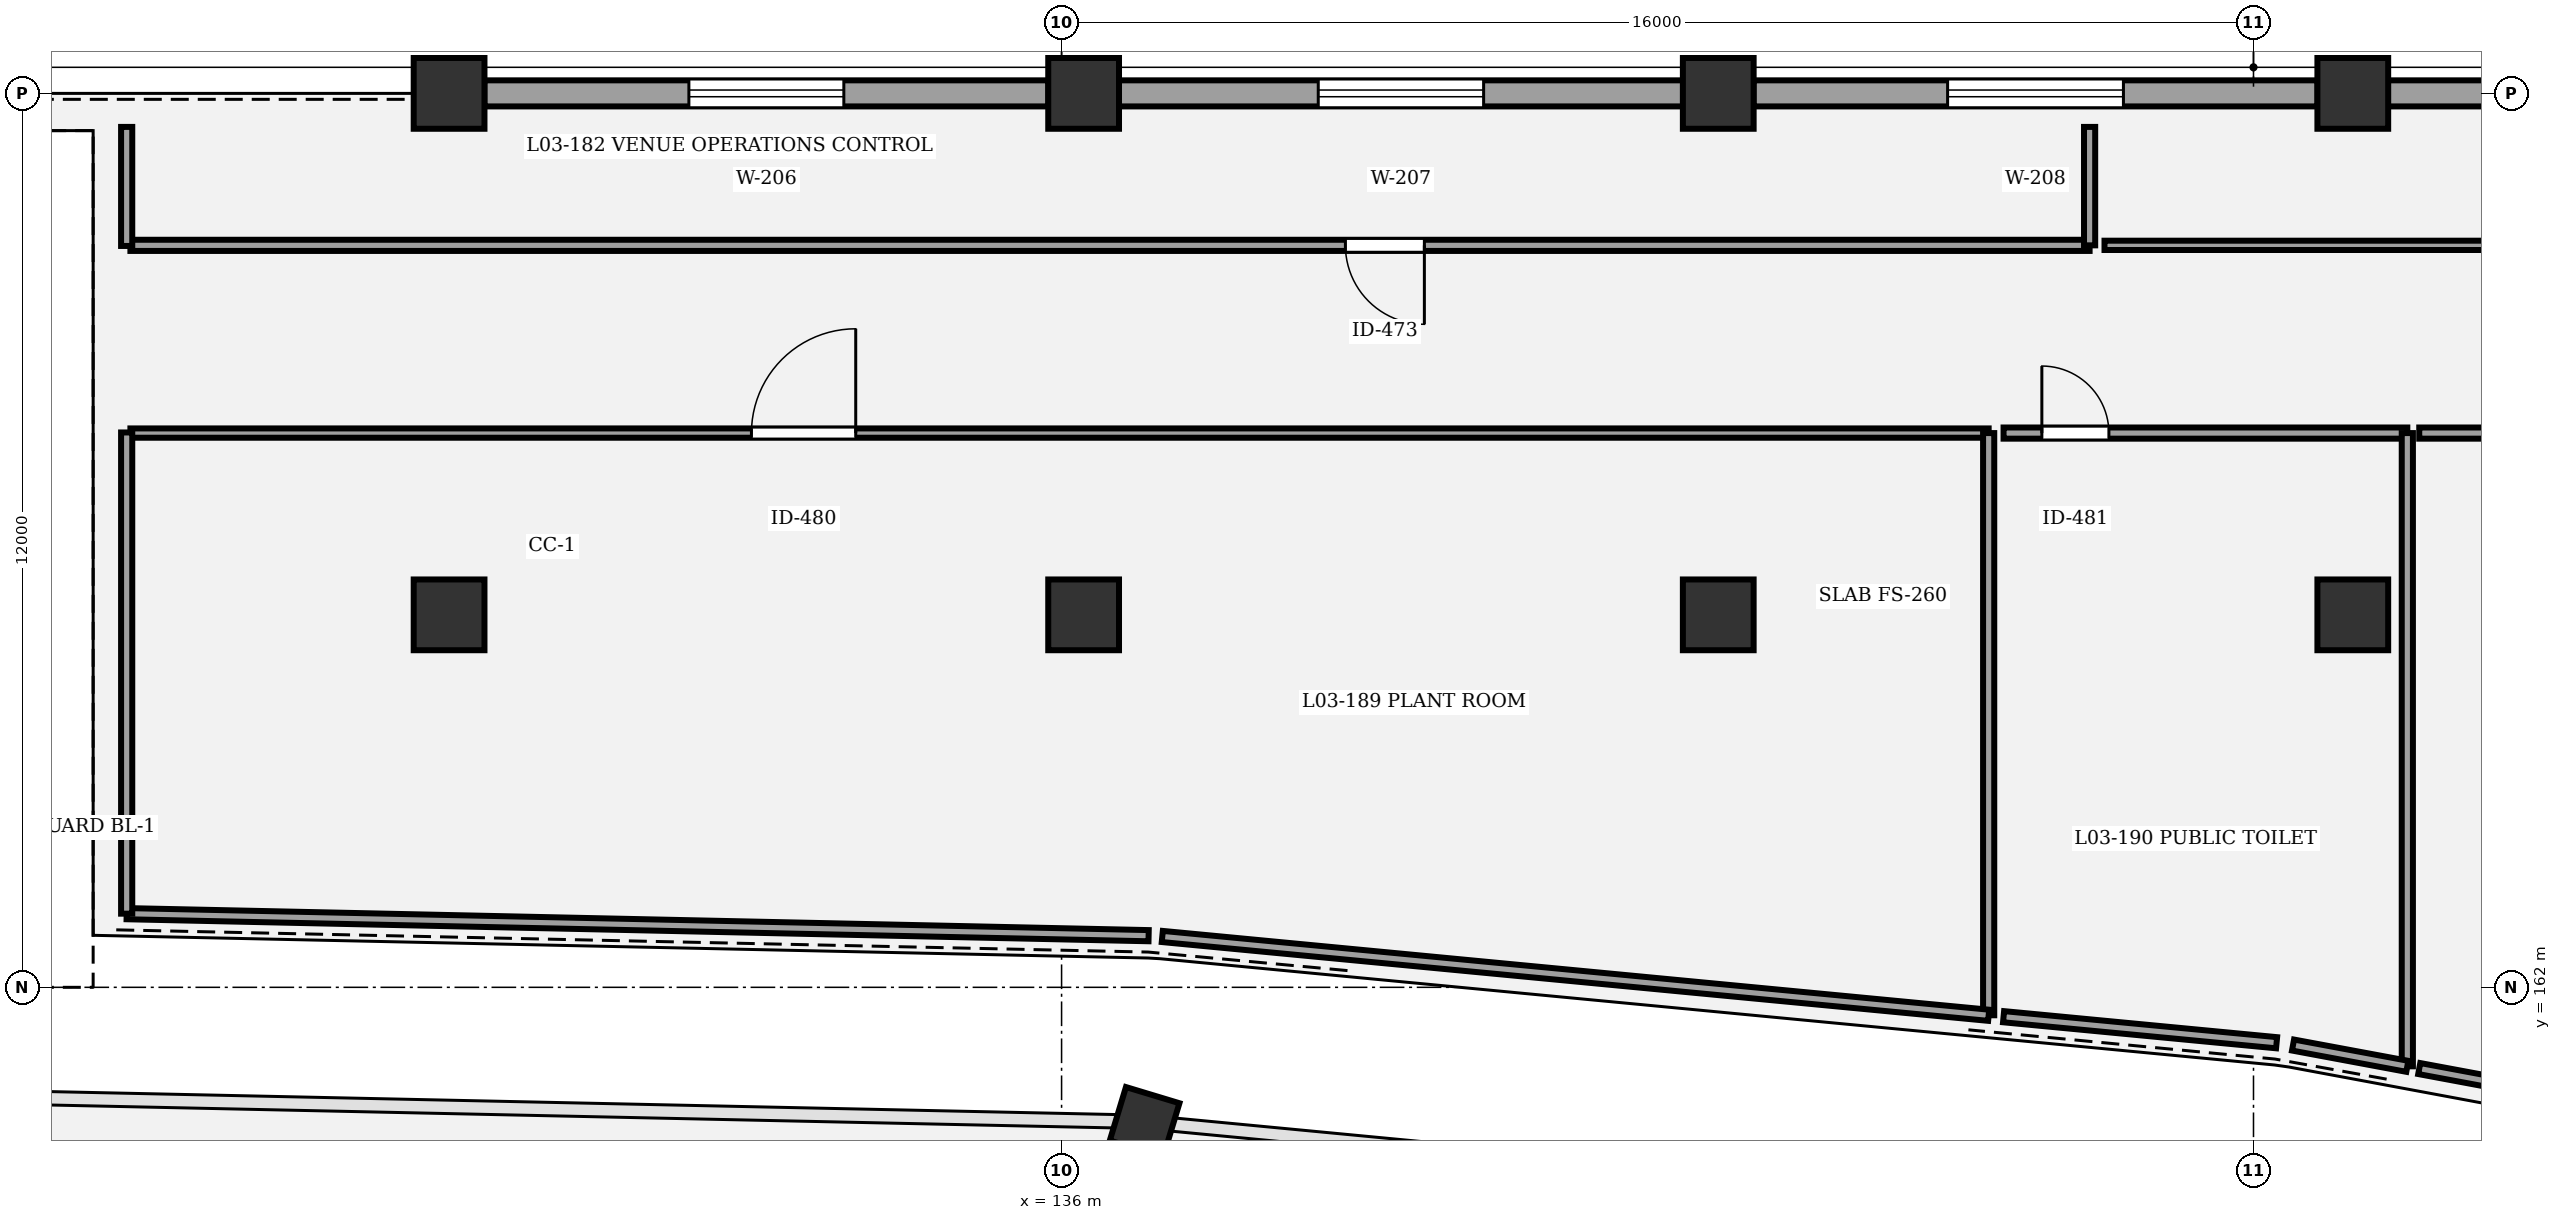
"""IFC4 building model, lengths in metres.
Left out: names, types, materials, properties, quantities, classifications, styles, units other than length and angle.
Written with IfcOpenShell. Run it as: python <this file> out.ifc"""

import sys

from ifc_helpers import new_model, si_unit, direction, frame, frame_2d, origin, origin_2d, place, context, subcontext, project, spatial, rectangle, circle, extrude, element, fill, save


model = new_model("IFC4")
c1 = context("Model", 3, precision=1e-05, world=origin(), true_north=direction((0.0, 1.0)))
c2 = subcontext(c1, "Body", "Model", "MODEL_VIEW")
j1 = project(units=[si_unit("LENGTHUNIT", "METRE"), si_unit("PLANEANGLEUNIT", "RADIAN")], contexts=[c1])
p1 = place(None, origin())
s1 = spatial("IfcSite", under=j1, at=p1, CompositionType="ELEMENT")
p2 = place(p1, origin())
s2 = spatial("IfcBuilding", under=s1, at=p2, CompositionType="ELEMENT")
p3 = place(p2, frame((0.0, 0.0, 14.7)))
s3 = spatial("IfcBuildingStorey", under=s2, at=p3, CompositionType="ELEMENT", Elevation=14.7)
p4 = place(p3, frame((137.115, 160.194, 0.0), z_axis=(0.0, 0.0, 1.0), x_axis=(0.289198876314, 0.957269037387, 0.0)))
e1 = element("IfcColumn", 1, at=p4, inside=s3, PredefinedType="COLUMN", context=c2, shape_type="SweptSolid", body=[
    extrude(rectangle(XDim=0.75, YDim=0.75, at=origin_2d()), origin(), (0.0, 0.0, 1.0), 4.5),
])
for number, where, z_axis, x_axis in (
    (2, (127.778, 167.0, 0.0), (0.0, 0.0, 1.0), (1.0, 0.0, 0.0)),
    (3, (127.778, 174.0, 0.0), (0.0, 0.0, 1.0), (1.0, 0.0, 0.0)),
    (4, (136.296, 167.0, 0.0), (0.0, 0.0, 1.0), (1.0, 0.0, 0.0)),
    (5, (136.296, 174.0, 0.0), (0.0, 0.0, 1.0), (1.0, 0.0, 0.0)),
    (6, (144.815, 167.0, 0.0), (0.0, 0.0, 1.0), (1.0, 0.0, 0.0)),
    (7, (144.815, 174.0, 0.0), (0.0, 0.0, 1.0), (1.0, 0.0, 0.0)),
    (8, (153.333, 167.0, 0.0), (0.0, 0.0, 1.0), (1.0, 0.0, 0.0)),
    (9, (153.333, 174.0, 0.0), (0.0, 0.0, 1.0), (1.0, 0.0, 0.0)),
):
    element("IfcColumn", number, at=place(p3, frame(where, z_axis=z_axis, x_axis=x_axis)), inside=s3, PredefinedType="COLUMN", context=c2, shape_type="SweptSolid", body=[
        extrude(circle(Radius=0.475, at=origin_2d()), origin(), (0.0, 0.0, 1.0), 4.5),
    ])
p5 = place(p3, frame((128.251, 174.0, 0.0), z_axis=(0.0, 0.0, 1.0), x_axis=(1.0, 0.0, 0.0)))
e10 = element("IfcWall", 10, at=p5, inside=s3, PredefinedType="STANDARD", context=c2, shape_type="SweptSolid", body=[
    extrude(rectangle(XDim=7.572, YDim=0.35, at=frame_2d((3.786, 0.0))), origin(), (0.0, 0.0, 1.0), 3.26),
])
p6 = place(p5, frame((2.746, 0.0, 0.9)))
e11 = element("IfcOpeningElement", 11, at=p6, cuts=e10, PredefinedType="OPENING", context=c2, shape_type="SweptSolid", body=[
    extrude(rectangle(XDim=2.08, YDim=1.95, at=frame_2d((1.04, 0.975))), frame((0.0, 0.185, 0.0), z_axis=(0.0, -1.0, 0.0), x_axis=(1.0, 0.0, 0.0)), (0.0, 0.0, 1.0), 0.37),
])
p7 = place(p3, frame((136.769, 174.0, 0.0), z_axis=(0.0, 0.0, 1.0), x_axis=(1.0, 0.0, 0.0)))
e12 = element("IfcWall", 12, at=p7, inside=s3, PredefinedType="STANDARD", context=c2, shape_type="SweptSolid", body=[
    extrude(rectangle(XDim=7.573, YDim=0.35, at=frame_2d((3.787, 0.0))), origin(), (0.0, 0.0, 1.0), 3.26),
])
p8 = place(p7, frame((2.677, 0.0, 0.9)))
e13 = element("IfcOpeningElement", 13, at=p8, cuts=e12, PredefinedType="OPENING", context=c2, shape_type="SweptSolid", body=[
    extrude(rectangle(XDim=2.22, YDim=1.95, at=frame_2d((1.11, 0.975))), frame((0.0, 0.185, 0.0), z_axis=(0.0, -1.0, 0.0), x_axis=(1.0, 0.0, 0.0)), (0.0, 0.0, 1.0), 0.37),
])
p9 = place(p3, frame((145.288, 174.0, 0.0), z_axis=(0.0, 0.0, 1.0), x_axis=(1.0, 0.0, 0.0)))
e14 = element("IfcWall", 14, at=p9, inside=s3, PredefinedType="STANDARD", context=c2, shape_type="SweptSolid", body=[
    extrude(rectangle(XDim=7.572, YDim=0.35, at=frame_2d((3.786, 0.0))), origin(), (0.0, 0.0, 1.0), 3.26),
])
p10 = place(p9, frame((2.606, 0.0, 0.9)))
e15 = element("IfcOpeningElement", 15, at=p10, cuts=e14, PredefinedType="OPENING", context=c2, shape_type="SweptSolid", body=[
    extrude(rectangle(XDim=2.36, YDim=1.95, at=frame_2d((1.18, 0.975))), frame((0.0, 0.185, 0.0), z_axis=(0.0, -1.0, 0.0), x_axis=(1.0, 0.0, 0.0)), (0.0, 0.0, 1.0), 0.37),
])
p11 = place(p3, frame((153.806, 174.0, 0.0), z_axis=(0.0, 0.0, 1.0), x_axis=(1.0, 0.0, 0.0)))
e16 = element("IfcWall", 16, at=p11, inside=s3, PredefinedType="STANDARD", context=c2, shape_type="SweptSolid", body=[
    extrude(rectangle(XDim=7.573, YDim=0.35, at=frame_2d((3.787, 0.0))), origin(), (0.0, 0.0, 1.0), 3.26),
])
p12 = place(p11, frame((2.527, 0.0, 0.9)))
e17 = element("IfcOpeningElement", 17, at=p12, cuts=e16, PredefinedType="OPENING", context=c2, shape_type="SweptSolid", body=[
    extrude(rectangle(XDim=2.52, YDim=1.95, at=frame_2d((1.26, 0.975))), frame((0.0, 0.185, 0.0), z_axis=(0.0, -1.0, 0.0), x_axis=(1.0, 0.0, 0.0)), (0.0, 0.0, 1.0), 0.37),
])
p13 = place(p3, frame((149.8, 171.96, 0.0), z_axis=(0.0, 0.0, 1.0), x_axis=(-1.0, 0.0, 0.0)))
e18 = element("IfcWall", 18, at=p13, inside=s3, PredefinedType="PARTITIONING", context=c2, shape_type="SweptSolid", body=[
    extrude(rectangle(XDim=26.3, YDim=0.15, at=frame_2d((13.15, 0.0))), origin(), (0.0, 0.0, 1.0), 3.25),
])
p14 = place(p13, frame((8.93, 0.0, 0.0)))
e19 = element("IfcOpeningElement", 19, at=p14, cuts=e18, PredefinedType="OPENING", context=c2, shape_type="SweptSolid", body=[
    extrude(rectangle(XDim=1.06, YDim=2.1, at=frame_2d((0.53, 1.05))), frame((0.0, 0.085, 0.0), z_axis=(0.0, -1.0, 0.0), x_axis=(1.0, 0.0, 0.0)), (0.0, 0.0, 1.0), 0.17),
])
p15 = place(p3, frame((176.1, 171.96, 0.0), z_axis=(0.0, 0.0, 1.0), x_axis=(-1.0, 0.0, 0.0)))
e20 = element("IfcWall", 20, at=p15, inside=s3, PredefinedType="PARTITIONING", context=c2, shape_type="SweptSolid", body=[
    extrude(rectangle(XDim=26.1, YDim=0.125, at=frame_2d((13.05, 0.0))), origin(), (0.0, 0.0, 1.0), 3.25),
])
p16 = place(p15, frame((8.846, 0.0, 0.0)))
e21 = element("IfcOpeningElement", 21, at=p16, cuts=e20, PredefinedType="OPENING", context=c2, shape_type="SweptSolid", body=[
    extrude(rectangle(XDim=1.1, YDim=2.1, at=frame_2d((0.55, 1.05))), frame((0.0, 0.073, 0.0), z_axis=(0.0, -1.0, 0.0), x_axis=(1.0, 0.0, 0.0)), (0.0, 0.0, 1.0), 0.145),
])
p17 = place(p3, frame((123.5, 169.44, 0.0), z_axis=(0.0, 0.0, 1.0), x_axis=(1.0, 0.0, 0.0)))
e22 = element("IfcWall", 22, at=p17, inside=s3, PredefinedType="PARTITIONING", context=c2, shape_type="SweptSolid", body=[
    extrude(rectangle(XDim=24.945, YDim=0.125, at=frame_2d((12.473, 0.0))), origin(), (0.0, 0.0, 1.0), 3.25),
])
p18 = place(p17, frame((8.337, 0.0, 0.0)))
e23 = element("IfcOpeningElement", 23, at=p18, cuts=e22, PredefinedType="OPENING", context=c2, shape_type="SweptSolid", body=[
    extrude(rectangle(XDim=1.4, YDim=2.1, at=frame_2d((0.7, 1.05))), frame((0.0, 0.073, 0.0), z_axis=(0.0, -1.0, 0.0), x_axis=(1.0, 0.0, 0.0)), (0.0, 0.0, 1.0), 0.145),
])
p19 = place(p3, frame((148.645, 169.44, 0.0), z_axis=(0.0, 0.0, 1.0), x_axis=(1.0, 0.0, 0.0)))
e24 = element("IfcWall", 24, at=p19, inside=s3, PredefinedType="PARTITIONING", context=c2, shape_type="SweptSolid", body=[
    extrude(rectangle(XDim=5.42, YDim=0.15, at=frame_2d((2.71, 0.0))), origin(), (0.0, 0.0, 1.0), 3.25),
])
p20 = place(p19, frame((0.514, 0.0, 0.0)))
e25 = element("IfcOpeningElement", 25, at=p20, cuts=e24, PredefinedType="OPENING", context=c2, shape_type="SweptSolid", body=[
    extrude(rectangle(XDim=0.9, YDim=2.2, at=frame_2d((0.45, 1.1))), frame((0.0, 0.085, 0.0), z_axis=(0.0, -1.0, 0.0), x_axis=(1.0, 0.0, 0.0)), (0.0, 0.0, 1.0), 0.17),
])
p21 = place(p3, frame((154.225, 169.44, 0.0), z_axis=(0.0, 0.0, 1.0), x_axis=(1.0, 0.0, 0.0)))
e26 = element("IfcWall", 26, at=p21, inside=s3, PredefinedType="PARTITIONING", context=c2, shape_type="SweptSolid", body=[
    extrude(rectangle(XDim=19.415, YDim=0.15, at=frame_2d((9.708, 0.0))), origin(), (0.0, 0.0, 1.0), 3.25),
])
p22 = place(p21, frame((2.46, 0.0, 0.0)))
e27 = element("IfcOpeningElement", 27, at=p22, cuts=e26, PredefinedType="OPENING", context=c2, shape_type="SweptSolid", body=[
    extrude(rectangle(XDim=0.94, YDim=2.2, at=frame_2d((0.47, 1.1))), frame((0.0, 0.085, 0.0), z_axis=(0.0, -1.0, 0.0), x_axis=(1.0, 0.0, 0.0)), (0.0, 0.0, 1.0), 0.17),
])
p23 = place(p3, frame((123.45, 171.952, 0.0), z_axis=(0.0, 0.0, 1.0), x_axis=(0.0, 1.0, 0.0)))
e28 = element("IfcWall", 28, at=p23, inside=s3, PredefinedType="PARTITIONING", context=c2, shape_type="SweptSolid", body=[
    extrude(rectangle(XDim=1.598, YDim=0.15, at=frame_2d((0.799, 0.0))), origin(), (0.0, 0.0, 1.0), 3.25),
])
p24 = place(p3, frame((149.8, 173.55, 0.0), z_axis=(0.0, 0.0, 1.0), x_axis=(0.0, -1.0, 0.0)))
e29 = element("IfcWall", 29, at=p24, inside=s3, PredefinedType="PARTITIONING", context=c2, shape_type="SweptSolid", body=[
    extrude(rectangle(XDim=1.59, YDim=0.15, at=frame_2d((0.795, 0.0))), origin(), (0.0, 0.0, 1.0), 3.25),
])
p25 = place(p3, frame((137.168, 162.693, 0.0), z_axis=(0.0, 0.0, 1.0), x_axis=(-0.999768230535, 0.021528706714, 0.0)))
e30 = element("IfcWall", 30, at=p25, inside=s3, PredefinedType="PARTITIONING", context=c2, shape_type="SweptSolid", body=[
    extrude(rectangle(XDim=13.722, YDim=0.15, at=frame_2d((6.861, 0.0))), origin(), (0.0, 0.0, 1.0), 3.25),
])
p26 = place(p3, frame((123.45, 162.989, 0.0), z_axis=(0.0, 0.0, 1.0), x_axis=(0.0, 1.0, 0.0)))
e31 = element("IfcWall", 31, at=p26, inside=s3, PredefinedType="PARTITIONING", context=c2, shape_type="SweptSolid", body=[
    extrude(rectangle(XDim=6.46, YDim=0.15, at=frame_2d((3.23, 0.0))), origin(), (0.0, 0.0, 1.0), 3.25),
])
p27 = place(p3, frame((148.445, 169.44, 0.0), z_axis=(0.0, 0.0, 1.0), x_axis=(0.0, -1.0, 0.0)))
e32 = element("IfcWall", 32, at=p27, inside=s3, PredefinedType="PARTITIONING", context=c2, shape_type="SweptSolid", body=[
    extrude(rectangle(XDim=7.815, YDim=0.15, at=frame_2d((3.908, 0.0))), origin(), (0.0, 0.0, 1.0), 3.25),
])
p28 = place(p3, frame((148.445, 161.625, 0.0), z_axis=(0.0, 0.0, 1.0), x_axis=(-0.995483944756, 0.094930057059, 0.0)))
e33 = element("IfcWall", 33, at=p28, inside=s3, PredefinedType="PARTITIONING", context=c2, shape_type="SweptSolid", body=[
    extrude(rectangle(XDim=11.144, YDim=0.15, at=frame_2d((5.572, 0.0))), origin(), (0.0, 0.0, 1.0), 3.25),
])
p29 = place(p3, frame((152.31, 161.256, 0.0), z_axis=(0.0, 0.0, 1.0), x_axis=(-0.995481155674, 0.094959300221, 0.0)))
e34 = element("IfcWall", 34, at=p29, inside=s3, PredefinedType="PARTITIONING", context=c2, shape_type="SweptSolid", body=[
    extrude(rectangle(XDim=3.682, YDim=0.15, at=frame_2d((1.841, 0.0))), origin(), (0.0, 0.0, 1.0), 3.25),
])
p30 = place(p3, frame((154.065, 169.44, 0.0), z_axis=(0.0, 0.0, 1.0), x_axis=(0.0, -1.0, 0.0)))
e35 = element("IfcWall", 35, at=p30, inside=s3, PredefinedType="PARTITIONING", context=c2, shape_type="SweptSolid", body=[
    extrude(rectangle(XDim=8.5, YDim=0.15, at=frame_2d((4.25, 0.0))), origin(), (0.0, 0.0, 1.0), 3.25),
])
p31 = place(p3, frame((154.065, 160.939, 0.0), z_axis=(0.0, 0.0, 1.0), x_axis=(-0.983110419565, 0.183013395528, 0.0)))
e36 = element("IfcWall", 36, at=p31, inside=s3, PredefinedType="PARTITIONING", context=c2, shape_type="SweptSolid", body=[
    extrude(rectangle(XDim=1.561, YDim=0.15, at=frame_2d((0.78, 0.0))), origin(), (0.0, 0.0, 1.0), 3.25),
])
p32 = place(p3, frame((165.259, 158.854, 0.0), z_axis=(0.0, 0.0, 1.0), x_axis=(-0.983091639371, 0.183114250127, 0.0)))
e37 = element("IfcWall", 37, at=p32, inside=s3, PredefinedType="PARTITIONING", context=c2, shape_type="SweptSolid", body=[
    extrude(rectangle(XDim=11.223, YDim=0.15, at=frame_2d((5.612, 0.0))), origin(), (0.0, 0.0, 1.0), 3.25),
])
p33 = place(p6, origin())
e38 = element("IfcWindow", 38, at=p33, inside=s3, PartitioningType="SINGLE_PANEL", PredefinedType="WINDOW", context=c2, shape_type="SweptSolid", body=[
    extrude(rectangle(XDim=2.08, YDim=1.95, at=frame_2d((1.04, 0.975))), frame((0.0, 0.03, 0.0), z_axis=(0.0, -1.0, 0.0), x_axis=(1.0, 0.0, 0.0)), (0.0, 0.0, 1.0), 0.06),
])
fill(e11, e38)
p34 = place(p8, origin())
e39 = element("IfcWindow", 39, at=p34, inside=s3, PartitioningType="SINGLE_PANEL", PredefinedType="WINDOW", context=c2, shape_type="SweptSolid", body=[
    extrude(rectangle(XDim=2.22, YDim=1.95, at=frame_2d((1.11, 0.975))), frame((0.0, 0.03, 0.0), z_axis=(0.0, -1.0, 0.0), x_axis=(1.0, 0.0, 0.0)), (0.0, 0.0, 1.0), 0.06),
])
fill(e13, e39)
p35 = place(p10, origin())
e40 = element("IfcWindow", 40, at=p35, inside=s3, PartitioningType="SINGLE_PANEL", PredefinedType="WINDOW", context=c2, shape_type="SweptSolid", body=[
    extrude(rectangle(XDim=2.36, YDim=1.95, at=frame_2d((1.18, 0.975))), frame((0.0, 0.03, 0.0), z_axis=(0.0, -1.0, 0.0), x_axis=(1.0, 0.0, 0.0)), (0.0, 0.0, 1.0), 0.06),
])
fill(e15, e40)
p36 = place(p14, origin())
e41 = element("IfcDoor", 41, at=p36, inside=s3, OperationType="SINGLE_SWING_LEFT", PredefinedType="DOOR", context=c2, shape_type="SweptSolid", body=[
    extrude(rectangle(XDim=1.06, YDim=2.1, at=frame_2d((0.53, 1.05))), frame((0.0, 0.025, 0.0), z_axis=(0.0, -1.0, 0.0), x_axis=(1.0, 0.0, 0.0)), (0.0, 0.0, 1.0), 0.05),
])
fill(e19, e41)
p37 = place(p18, origin())
e42 = element("IfcDoor", 42, at=p37, inside=s3, OperationType="SINGLE_SWING_RIGHT", PredefinedType="DOOR", context=c2, shape_type="SweptSolid", body=[
    extrude(rectangle(XDim=1.4, YDim=2.1, at=frame_2d((0.7, 1.05))), frame((0.0, 0.025, 0.0), z_axis=(0.0, -1.0, 0.0), x_axis=(1.0, 0.0, 0.0)), (0.0, 0.0, 1.0), 0.05),
])
fill(e23, e42)
p38 = place(p20, origin())
e43 = element("IfcDoor", 43, at=p38, inside=s3, OperationType="SINGLE_SWING_LEFT", PredefinedType="DOOR", context=c2, shape_type="SweptSolid", body=[
    extrude(rectangle(XDim=0.9, YDim=2.2, at=frame_2d((0.45, 1.1))), frame((0.0, 0.025, 0.0), z_axis=(0.0, -1.0, 0.0), x_axis=(1.0, 0.0, 0.0)), (0.0, 0.0, 1.0), 0.05),
])
fill(e25, e43)
save(model, sys.argv[1])
